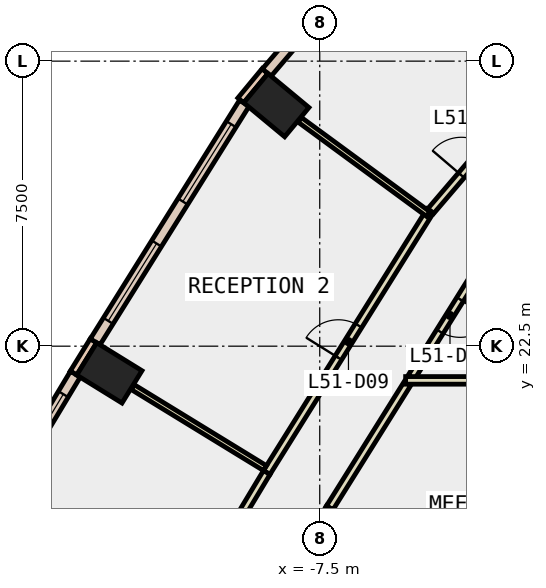
"""IFC4 building model, lengths in metres.
Left out: names, types, materials, properties, quantities, classifications, styles, units other than length and angle.
Written with IfcOpenShell. Run it as: python <this file> out.ifc"""

import sys

from ifc_helpers import new_model, si_unit, direction, frame, frame_2d, origin, origin_2d, place, context, subcontext, project, spatial, rectangle, extrude, element, fill, save


model = new_model("IFC4")
c1 = context("Model", 3, precision=1e-05, world=origin(), true_north=direction((0.0, 1.0)))
c2 = subcontext(c1, "Body", "Model", "MODEL_VIEW")
j1 = project(units=[si_unit("LENGTHUNIT", "METRE"), si_unit("PLANEANGLEUNIT", "RADIAN")], contexts=[c1])
p1 = place(None, origin())
s1 = spatial("IfcSite", under=j1, at=p1, CompositionType="ELEMENT")
p2 = place(p1, origin())
s2 = spatial("IfcBuilding", under=s1, at=p2, CompositionType="ELEMENT")
p3 = place(p2, frame((0.0, 0.0, 227.6)))
s3 = spatial("IfcBuildingStorey", under=s2, at=p3, CompositionType="ELEMENT", Elevation=227.6)
for number, where, z_axis, x_axis in (
    (1, (-8.642, 28.842, -0.4), (0.0, 0.0, 1.0), (0.639, 0.769, 0.0)),
    (2, (-13.036, 21.797, -0.4), (0.0, 0.0, 1.0), (0.525, 0.851, 0.0)),
):
    element("IfcColumn", number, at=place(p3, frame(where, z_axis=z_axis, x_axis=x_axis)), inside=s3, PredefinedType="COLUMN", context=c2, shape_type="SweptSolid", body=[
        extrude(rectangle(XDim=1.0, YDim=1.4, at=origin_2d()), origin(), (0.0, 0.0, 1.0), 4.2),
    ])
p4 = place(p3, frame((-8.939, 29.738, 0.0), z_axis=(0.0, 0.0, 1.0), x_axis=(-0.637972365578, -0.770059257953, 0.0)))
e3 = element("IfcWall", 3, at=p4, inside=s3, PredefinedType="STANDARD", context=c2, shape_type="SweptSolid", body=[
    extrude(rectangle(XDim=1.0, YDim=0.2, at=frame_2d((0.5, 0.0))), origin(), (0.0, 0.0, 1.0), 3.8),
])
p5 = place(p3, frame((-13.454, 22.643, 0.0), z_axis=(0.0, 0.0, 1.0), x_axis=(-0.525648735675, -0.850701714282, 0.0)))
e4 = element("IfcWall", 4, at=p5, inside=s3, PredefinedType="STANDARD", context=c2, shape_type="SweptSolid", body=[
    extrude(rectangle(XDim=1.0, YDim=0.2, at=frame_2d((0.5, 0.0))), origin(), (0.0, 0.0, 1.0), 3.8),
])
p6 = place(p3, frame((-5.975, 33.114, 0.0), z_axis=(0.0, 0.0, 1.0), x_axis=(-0.649967502437, -0.75996200285, 0.0)))
e5 = element("IfcWall", 5, at=p6, inside=s3, PredefinedType="STANDARD", context=c2, shape_type="SweptSolid", body=[
    extrude(rectangle(XDim=4.492, YDim=0.3, at=frame_2d((2.246, 0.0))), origin(), (0.0, 0.0, 1.0), 3.8),
])
p7 = place(p6, frame((1.546, 0.0, 0.9)))
e6 = element("IfcOpeningElement", 6, at=p7, cuts=e5, PredefinedType="OPENING", context=c2, shape_type="SweptSolid", body=[
    extrude(rectangle(XDim=1.4, YDim=2.6, at=frame_2d((0.7, 1.3))), frame((0.0, 0.16, 0.0), z_axis=(0.0, -1.0, 0.0), x_axis=(1.0, 0.0, 0.0)), (0.0, 0.0, 1.0), 0.32),
])
p8 = place(p3, frame((-9.485, 28.893, 0.0), z_axis=(0.0, 0.0, 1.0), x_axis=(-0.530037467052, -0.847974223383, 0.0)))
e7 = element("IfcWall", 7, at=p8, inside=s3, PredefinedType="STANDARD", context=c2, shape_type="SweptSolid", body=[
    extrude(rectangle(XDim=7.405, YDim=0.3, at=frame_2d((3.702, 0.0))), origin(), (0.0, 0.0, 1.0), 3.8),
])
p9 = place(p8, frame((0.651, 0.0, 0.9)))
e8 = element("IfcOpeningElement", 8, at=p9, cuts=e7, PredefinedType="OPENING", context=c2, shape_type="SweptSolid", body=[
    extrude(rectangle(XDim=2.4, YDim=2.6, at=frame_2d((1.2, 1.3))), frame((0.0, 0.16, 0.0), z_axis=(0.0, -1.0, 0.0), x_axis=(1.0, 0.0, 0.0)), (0.0, 0.0, 1.0), 0.32),
])
p10 = place(p8, frame((4.354, 0.0, 0.9)))
e9 = element("IfcOpeningElement", 9, at=p10, cuts=e7, PredefinedType="OPENING", context=c2, shape_type="SweptSolid", body=[
    extrude(rectangle(XDim=2.4, YDim=2.6, at=frame_2d((1.2, 1.3))), frame((0.0, 0.16, 0.0), z_axis=(0.0, -1.0, 0.0), x_axis=(1.0, 0.0, 0.0)), (0.0, 0.0, 1.0), 0.32),
])
p11 = place(p3, frame((-13.931, 21.763, 0.0), z_axis=(0.0, 0.0, 1.0), x_axis=(-0.515049705348, -0.857160312323, 0.0)))
e10 = element("IfcWall", 10, at=p11, inside=s3, PredefinedType="STANDARD", context=c2, shape_type="SweptSolid", body=[
    extrude(rectangle(XDim=7.258, YDim=0.3, at=frame_2d((3.629, 0.0))), origin(), (0.0, 0.0, 1.0), 3.8),
])
p12 = place(p11, frame((0.614, 0.0, 0.9)))
e11 = element("IfcOpeningElement", 11, at=p12, cuts=e10, PredefinedType="OPENING", context=c2, shape_type="SweptSolid", body=[
    extrude(rectangle(XDim=2.4, YDim=2.6, at=frame_2d((1.2, 1.3))), frame((0.0, 0.16, 0.0), z_axis=(0.0, -1.0, 0.0), x_axis=(1.0, 0.0, 0.0)), (0.0, 0.0, 1.0), 0.32),
])
p13 = place(p11, frame((4.243, 0.0, 0.9)))
e12 = element("IfcOpeningElement", 12, at=p13, cuts=e10, PredefinedType="OPENING", context=c2, shape_type="SweptSolid", body=[
    extrude(rectangle(XDim=2.4, YDim=2.6, at=frame_2d((1.2, 1.3))), frame((0.0, 0.16, 0.0), z_axis=(0.0, -1.0, 0.0), x_axis=(1.0, 0.0, 0.0)), (0.0, 0.0, 1.0), 0.32),
])
p14 = place(p3, frame((-5.193, 21.515, 0.0), z_axis=(0.0, 0.0, 1.0), x_axis=(-0.530175390862, -0.847887996686, 0.0)))
e13 = element("IfcWall", 13, at=p14, inside=s3, PredefinedType="PARTITIONING", context=c2, shape_type="SweptSolid", body=[
    extrude(rectangle(XDim=3.855, YDim=0.2, at=frame_2d((1.928, 0.0))), origin(), (0.0, 0.0, 1.0), 3.8),
])
p15 = place(p3, frame((-7.237, 18.246, 0.0), z_axis=(0.0, 0.0, 1.0), x_axis=(-0.514959644878, -0.857214421336, 0.0)))
e14 = element("IfcWall", 14, at=p15, inside=s3, PredefinedType="PARTITIONING", context=c2, shape_type="SweptSolid", body=[
    extrude(rectangle(XDim=4.179, YDim=0.2, at=frame_2d((2.089, 0.0))), origin(), (0.0, 0.0, 1.0), 3.8),
])
p16 = place(p15, frame((1.589, 0.0, 0.0)))
e15 = element("IfcOpeningElement", 15, at=p16, cuts=e14, PredefinedType="OPENING", context=c2, shape_type="SweptSolid", body=[
    extrude(rectangle(XDim=1.0, YDim=2.1, at=frame_2d((0.5, 1.05))), frame((0.0, 0.11, 0.0), z_axis=(0.0, -1.0, 0.0), x_axis=(1.0, 0.0, 0.0)), (0.0, 0.0, 1.0), 0.22),
])
p17 = place(p3, frame((-3.057, 24.933, 0.0), z_axis=(0.0, 0.0, 1.0), x_axis=(-0.529998940003, -0.847998304005, 0.0)))
e16 = element("IfcWall", 16, at=p17, inside=s3, PredefinedType="PARTITIONING", context=c2, shape_type="SweptSolid", body=[
    extrude(rectangle(XDim=3.83, YDim=0.2, at=frame_2d((1.915, 0.0))), origin(), (0.0, 0.0, 1.0), 3.8),
])
p18 = place(p17, frame((1.416, 0.0, 0.0)))
e17 = element("IfcOpeningElement", 17, at=p18, cuts=e16, PredefinedType="OPENING", context=c2, shape_type="SweptSolid", body=[
    extrude(rectangle(XDim=1.0, YDim=2.1, at=frame_2d((0.5, 1.05))), frame((0.0, 0.11, 0.0), z_axis=(0.0, -1.0, 0.0), x_axis=(1.0, 0.0, 0.0)), (0.0, 0.0, 1.0), 0.22),
])
p19 = place(p3, frame((-4.581, 26.052, 0.0), z_axis=(0.0, 0.0, 1.0), x_axis=(0.650040973726, 0.759899159413, 0.0)))
e18 = element("IfcWall", 18, at=p19, inside=s3, PredefinedType="PARTITIONING", context=c2, shape_type="SweptSolid", body=[
    extrude(rectangle(XDim=3.485, YDim=0.2, at=frame_2d((1.742, 0.0))), origin(), (0.0, 0.0, 1.0), 3.8),
])
p20 = place(p19, frame((1.243, 0.0, 0.0)))
e19 = element("IfcOpeningElement", 19, at=p20, cuts=e18, PredefinedType="OPENING", context=c2, shape_type="SweptSolid", body=[
    extrude(rectangle(XDim=1.0, YDim=2.1, at=frame_2d((0.5, 1.05))), frame((0.0, 0.11, 0.0), z_axis=(0.0, -1.0, 0.0), x_axis=(1.0, 0.0, 0.0)), (0.0, 0.0, 1.0), 0.22),
])
p21 = place(p3, frame((-8.896, 19.176, 0.0), z_axis=(0.0, 0.0, 1.0), x_axis=(0.529985425286, 0.848006750553, 0.0)))
e20 = element("IfcWall", 20, at=p21, inside=s3, PredefinedType="PARTITIONING", context=c2, shape_type="SweptSolid", body=[
    extrude(rectangle(XDim=8.119, YDim=0.2, at=frame_2d((4.06, 0.0))), origin(), (0.0, 0.0, 1.0), 3.8),
])
p22 = place(p21, frame((3.56, 0.0, 0.0)))
e21 = element("IfcOpeningElement", 21, at=p22, cuts=e20, PredefinedType="OPENING", context=c2, shape_type="SweptSolid", body=[
    extrude(rectangle(XDim=1.0, YDim=2.1, at=frame_2d((0.5, 1.05))), frame((0.0, 0.11, 0.0), z_axis=(0.0, -1.0, 0.0), x_axis=(1.0, 0.0, 0.0)), (0.0, 0.0, 1.0), 0.22),
])
p23 = place(p3, frame((-13.057, 12.247, 0.0), z_axis=(0.0, 0.0, 1.0), x_axis=(0.51490435266, 0.857247634941, 0.0)))
e22 = element("IfcWall", 22, at=p23, inside=s3, PredefinedType="PARTITIONING", context=c2, shape_type="SweptSolid", body=[
    extrude(rectangle(XDim=8.083, YDim=0.2, at=frame_2d((4.042, 0.0))), origin(), (0.0, 0.0, 1.0), 3.8),
])
p24 = place(p23, frame((3.616, 0.0, 0.0)))
e23 = element("IfcOpeningElement", 23, at=p24, cuts=e22, PredefinedType="OPENING", context=c2, shape_type="SweptSolid", body=[
    extrude(rectangle(XDim=1.0, YDim=2.1, at=frame_2d((0.5, 1.05))), frame((0.0, 0.11, 0.0), z_axis=(0.0, -1.0, 0.0), x_axis=(1.0, 0.0, 0.0)), (0.0, 0.0, 1.0), 0.22),
])
p25 = place(p3, frame((-5.24, 21.6, 0.0), z_axis=(0.0, 0.0, 1.0), x_axis=(1.0, 0.0, 0.0)))
e24 = element("IfcWall", 24, at=p25, inside=s3, PredefinedType="PARTITIONING", context=c2, shape_type="SweptSolid", body=[
    extrude(rectangle(XDim=4.84, YDim=0.2, at=frame_2d((2.42, 0.0))), origin(), (0.0, 0.0, 1.0), 3.8),
])
p26 = place(p3, frame((-4.646, 25.976, 0.0), z_axis=(0.0, 0.0, 1.0), x_axis=(-0.806134630684, 0.591732166788, 0.0)))
e25 = element("IfcWall", 25, at=p26, inside=s3, PredefinedType="PARTITIONING", context=c2, shape_type="SweptSolid", body=[
    extrude(rectangle(XDim=4.193, YDim=0.15, at=frame_2d((2.096, 0.0))), origin(), (0.0, 0.0, 1.0), 3.8),
])
p27 = place(p3, frame((-8.942, 19.292, 0.0), z_axis=(0.0, 0.0, 1.0), x_axis=(-0.85273109234, 0.522350154739, 0.0)))
e26 = element("IfcWall", 26, at=p27, inside=s3, PredefinedType="PARTITIONING", context=c2, shape_type="SweptSolid", body=[
    extrude(rectangle(XDim=4.08, YDim=0.15, at=frame_2d((2.04, 0.0))), origin(), (0.0, 0.0, 1.0), 3.8),
])
p28 = place(p9, origin())
e27 = element("IfcWindow", 27, at=p28, inside=s3, PartitioningType="SINGLE_PANEL", PredefinedType="WINDOW", context=c2, shape_type="SweptSolid", body=[
    extrude(rectangle(XDim=2.4, YDim=2.6, at=frame_2d((1.2, 1.3))), frame((0.0, 0.03, 0.0), z_axis=(0.0, -1.0, 0.0), x_axis=(1.0, 0.0, 0.0)), (0.0, 0.0, 1.0), 0.06),
])
fill(e8, e27)
p29 = place(p10, origin())
e28 = element("IfcWindow", 28, at=p29, inside=s3, PartitioningType="SINGLE_PANEL", PredefinedType="WINDOW", context=c2, shape_type="SweptSolid", body=[
    extrude(rectangle(XDim=2.4, YDim=2.6, at=frame_2d((1.2, 1.3))), frame((0.0, 0.03, 0.0), z_axis=(0.0, -1.0, 0.0), x_axis=(1.0, 0.0, 0.0)), (0.0, 0.0, 1.0), 0.06),
])
fill(e9, e28)
p30 = place(p12, origin())
e29 = element("IfcWindow", 29, at=p30, inside=s3, PartitioningType="SINGLE_PANEL", PredefinedType="WINDOW", context=c2, shape_type="SweptSolid", body=[
    extrude(rectangle(XDim=2.4, YDim=2.6, at=frame_2d((1.2, 1.3))), frame((0.0, 0.03, 0.0), z_axis=(0.0, -1.0, 0.0), x_axis=(1.0, 0.0, 0.0)), (0.0, 0.0, 1.0), 0.06),
])
fill(e11, e29)
p31 = place(p20, origin())
e30 = element("IfcDoor", 30, at=p31, inside=s3, OperationType="SINGLE_SWING_LEFT", PredefinedType="DOOR", context=c2, shape_type="SweptSolid", body=[
    extrude(rectangle(XDim=1.0, YDim=2.1, at=frame_2d((0.5, 1.05))), frame((0.0, 0.025, 0.0), z_axis=(0.0, -1.0, 0.0), x_axis=(1.0, 0.0, 0.0)), (0.0, 0.0, 1.0), 0.05),
])
fill(e19, e30)
p32 = place(p22, origin())
e31 = element("IfcDoor", 31, at=p32, inside=s3, OperationType="SINGLE_SWING_LEFT", PredefinedType="DOOR", context=c2, shape_type="SweptSolid", body=[
    extrude(rectangle(XDim=1.0, YDim=2.1, at=frame_2d((0.5, 1.05))), frame((0.0, 0.025, 0.0), z_axis=(0.0, -1.0, 0.0), x_axis=(1.0, 0.0, 0.0)), (0.0, 0.0, 1.0), 0.05),
])
fill(e21, e31)
p33 = place(p18, origin())
e32 = element("IfcDoor", 32, at=p33, inside=s3, OperationType="SINGLE_SWING_LEFT", PredefinedType="DOOR", context=c2, shape_type="SweptSolid", body=[
    extrude(rectangle(XDim=1.0, YDim=2.1, at=frame_2d((0.5, 1.05))), frame((0.0, 0.025, 0.0), z_axis=(0.0, -1.0, 0.0), x_axis=(1.0, 0.0, 0.0)), (0.0, 0.0, 1.0), 0.05),
])
fill(e17, e32)
save(model, sys.argv[1])
